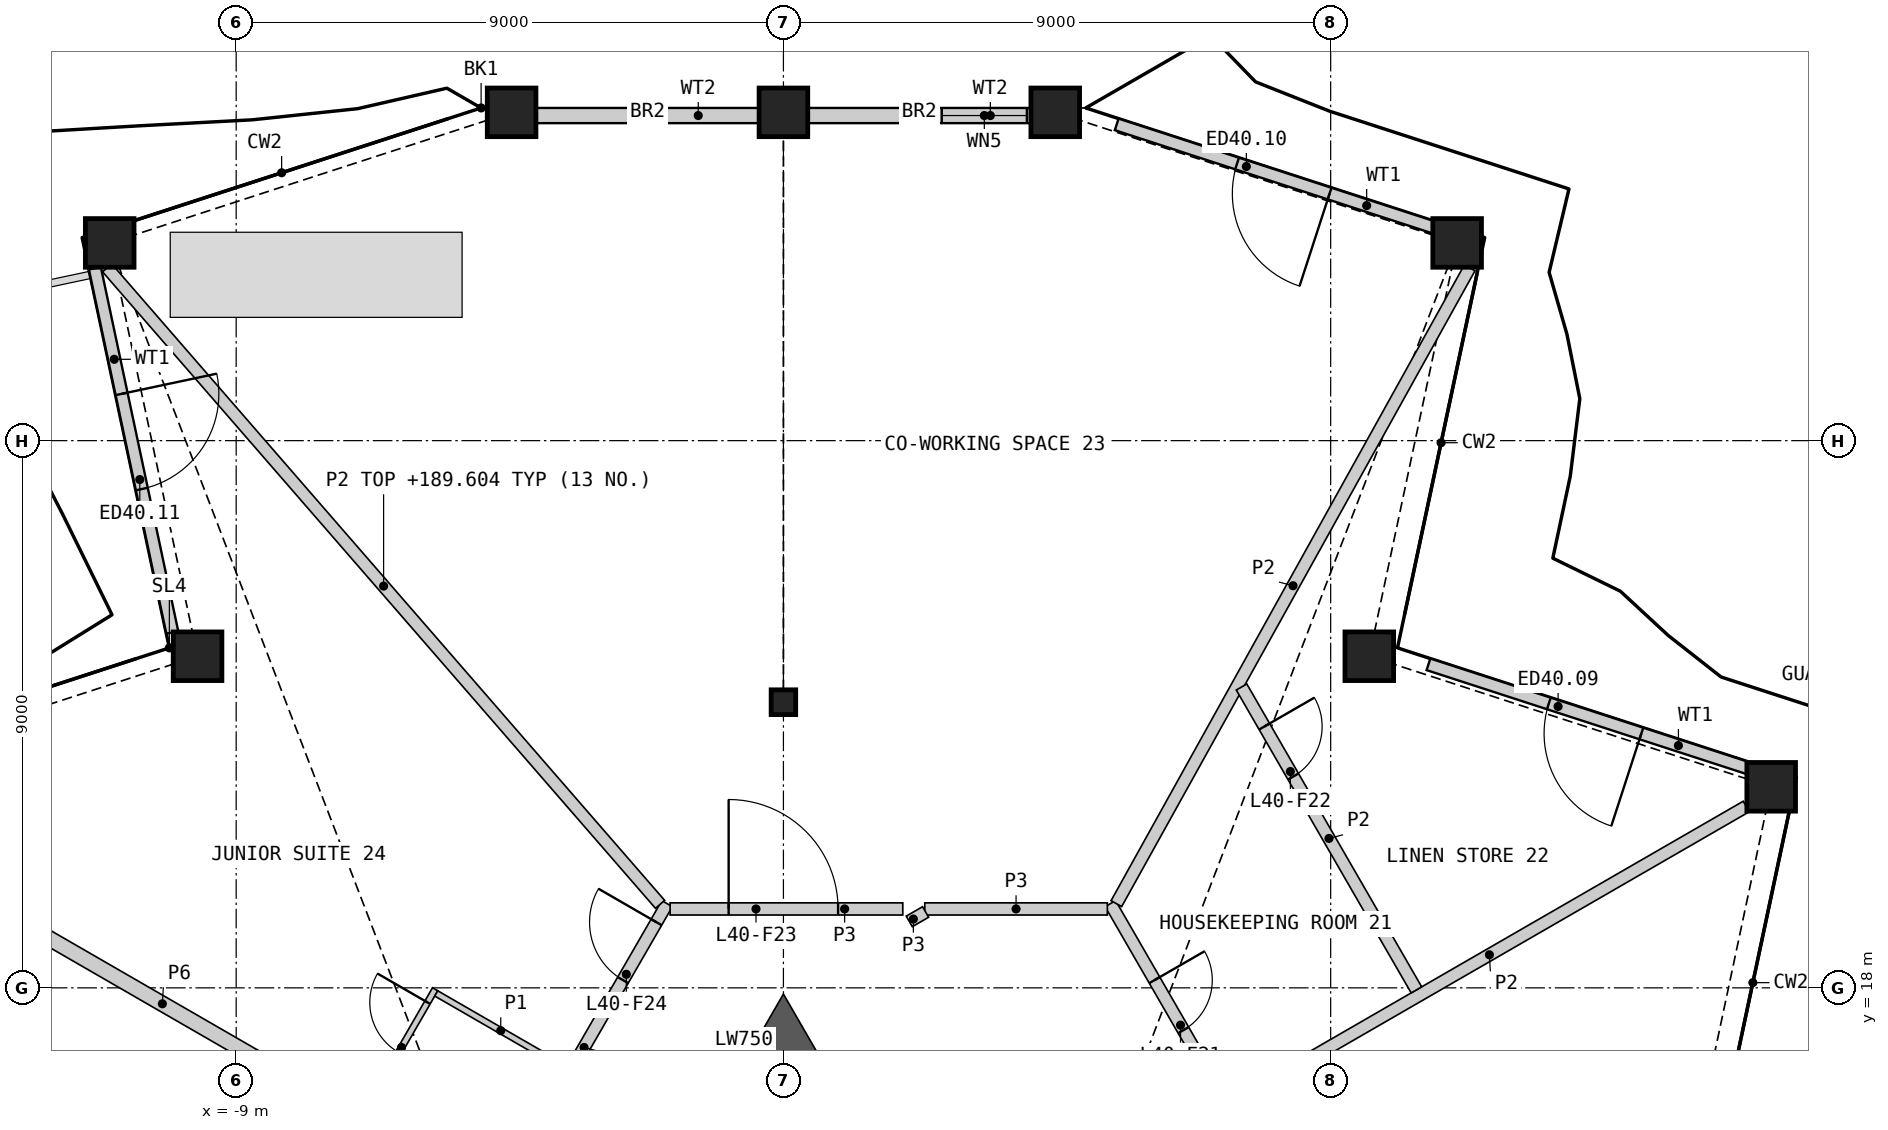
"""IFC4 building model, lengths in metres.
Left out: names, types, materials, properties, quantities, classifications, styles, units other than length and angle.
Written with IfcOpenShell. Run it as: python <this file> out.ifc"""

import sys

from ifc_helpers import new_model, si_unit, direction, frame, frame_2d, origin, origin_2d, place, context, subcontext, project, spatial, polyline, rectangle, hollow_rectangle, i_section, outline, extrude, element, fill, save


model = new_model("IFC4")
c1 = context("Model", 3, precision=1e-05, world=origin(), true_north=direction((0.0, 1.0)))
c2 = subcontext(c1, "Body", "Model", "MODEL_VIEW")
j1 = project(units=[si_unit("LENGTHUNIT", "METRE"), si_unit("PLANEANGLEUNIT", "RADIAN")], contexts=[c1])
p1 = place(None, origin())
s1 = spatial("IfcSite", under=j1, at=p1, CompositionType="ELEMENT")
p2 = place(p1, origin())
s2 = spatial("IfcBuilding", under=s1, at=p2, CompositionType="ELEMENT")
p3 = place(p2, frame((0.0, 0.0, 187.2)))
s3 = spatial("IfcBuildingStorey", under=s2, at=p3, CompositionType="ELEMENT", Elevation=187.2)
for number, where, z_axis, x_axis in (
    (1, (16.245, 21.306, 0.0), (0.0, 0.0, 1.0), (1.0, 0.0, 0.0)),
    (2, (9.635, 23.454, 0.0), (0.0, 0.0, 1.0), (1.0, 0.0, 0.0)),
    (3, (11.08, 30.252, 0.0), (0.0, 0.0, 1.0), (1.0, 0.0, 0.0)),
    (4, (4.47, 32.399, 0.0), (0.0, 0.0, 1.0), (1.0, 0.0, 0.0)),
    (5, (0.0, 32.399, 0.0), (0.0, 0.0, 1.0), (1.0, 0.0, 0.0)),
    (6, (-4.47, 32.399, 0.0), (0.0, 0.0, 1.0), (1.0, 0.0, 0.0)),
    (7, (-11.08, 30.252, 0.0), (0.0, 0.0, 1.0), (1.0, 0.0, 0.0)),
    (8, (-9.635, 23.454, 0.0), (0.0, 0.0, 1.0), (1.0, 0.0, 0.0)),
):
    element("IfcColumn", number, at=place(p3, frame(where, z_axis=z_axis, x_axis=x_axis)), inside=s3, PredefinedType="COLUMN", context=c2, shape_type="SweptSolid", body=[
        extrude(hollow_rectangle(XDim=0.8, YDim=0.8, WallThickness=0.05, at=origin_2d()), origin(), (0.0, 0.0, 1.0), 3.6),
    ])
p4 = place(p3, frame((0.0, 22.698, 0.0), z_axis=(0.0, 0.0, 1.0), x_axis=(1.0, 0.0, 0.0)))
e9 = element("IfcColumn", 9, at=p4, inside=s3, PredefinedType="COLUMN", context=c2, shape_type="SweptSolid", body=[
    extrude(i_section(OverallWidth=0.404, OverallDepth=0.407, WebThickness=0.027, FlangeThickness=0.044, at=origin_2d()), origin(), (0.0, 0.0, 1.0), 3.6),
])
p5 = place(p3, frame((16.089, 21.54, 0.0), z_axis=(0.0, 0.0, 1.0), x_axis=(-0.951053678976, 0.30902572661, 0.0)))
e10 = element("IfcWall", 10, at=p5, inside=s3, PredefinedType="SOLIDWALL", context=c2, shape_type="SweptSolid", body=[
    extrude(rectangle(XDim=5.763, YDim=0.2, at=frame_2d((2.882, 0.0))), origin(), (0.0, 0.0, 1.0), 2.701),
])
p6 = place(p5, frame((2.082, 0.0, 0.0)))
e11 = element("IfcOpeningElement", 11, at=p6, cuts=e10, PredefinedType="OPENING", context=c2, shape_type="SweptSolid", body=[
    extrude(rectangle(XDim=1.6, YDim=2.4, at=frame_2d((0.8, 1.2))), frame((0.0, 0.11, 0.0), z_axis=(0.0, -1.0, 0.0), x_axis=(1.0, 0.0, 0.0)), (0.0, 0.0, 1.0), 0.22),
])
p7 = place(p3, frame((10.962, 30.42, 0.0), z_axis=(0.0, 0.0, 1.0), x_axis=(-0.951062083689, 0.308999859173, 0.0)))
e12 = element("IfcWall", 12, at=p7, inside=s3, PredefinedType="SOLIDWALL", context=c2, shape_type="SweptSolid", body=[
    extrude(rectangle(XDim=5.763, YDim=0.2, at=frame_2d((2.881, 0.0))), origin(), (0.0, 0.0, 1.0), 2.701),
])
p8 = place(p7, frame((2.082, 0.0, 0.0)))
e13 = element("IfcOpeningElement", 13, at=p8, cuts=e12, PredefinedType="OPENING", context=c2, shape_type="SweptSolid", body=[
    extrude(rectangle(XDim=1.6, YDim=2.4, at=frame_2d((0.8, 1.2))), frame((0.0, 0.11, 0.0), z_axis=(0.0, -1.0, 0.0), x_axis=(1.0, 0.0, 0.0)), (0.0, 0.0, 1.0), 0.22),
])
p9 = place(p3, frame((4.404, 32.347, 0.0), z_axis=(0.0, 0.0, 1.0), x_axis=(-1.0, 0.0, 0.0)))
e14 = element("IfcWall", 14, at=p9, inside=s3, PredefinedType="SOLIDWALL", context=c2, shape_type="SweptSolid", body=[
    extrude(rectangle(XDim=4.004, YDim=0.25, at=frame_2d((2.002, 0.0))), origin(), (0.0, 0.0, 1.0), 2.701),
])
p10 = place(p9, frame((0.4, 0.0, 1.6)))
e15 = element("IfcOpeningElement", 15, at=p10, cuts=e14, PredefinedType="OPENING", context=c2, shape_type="SweptSolid", body=[
    extrude(rectangle(XDim=1.4, YDim=0.9, at=frame_2d((0.7, 0.45))), frame((0.0, 0.135, 0.0), z_axis=(0.0, -1.0, 0.0), x_axis=(1.0, 0.0, 0.0)), (0.0, 0.0, 1.0), 0.27),
])
p11 = place(p3, frame((-0.4, 32.347, 0.0), z_axis=(0.0, 0.0, 1.0), x_axis=(-1.0, 0.0, 0.0)))
e16 = element("IfcWall", 16, at=p11, inside=s3, PredefinedType="SOLIDWALL", context=c2, shape_type="SweptSolid", body=[
    extrude(rectangle(XDim=4.004, YDim=0.25, at=frame_2d((2.002, 0.0))), origin(), (0.0, 0.0, 1.0), 2.701),
])
p12 = place(p3, frame((-11.324, 29.835, 0.0), z_axis=(0.0, 0.0, 1.0), x_axis=(0.207925037413, -0.978144763732, 0.0)))
e17 = element("IfcWall", 17, at=p12, inside=s3, PredefinedType="SOLIDWALL", context=c2, shape_type="SweptSolid", body=[
    extrude(rectangle(XDim=6.123, YDim=0.2, at=frame_2d((3.062, 0.0))), origin(), (0.0, 0.0, 1.0), 2.701),
])
p13 = place(p12, frame((2.113, 0.0, 0.0)))
e18 = element("IfcOpeningElement", 18, at=p13, cuts=e17, PredefinedType="OPENING", context=c2, shape_type="SweptSolid", body=[
    extrude(rectangle(XDim=1.6, YDim=2.4, at=frame_2d((0.8, 1.2))), frame((0.0, 0.11, 0.0), z_axis=(0.0, -1.0, 0.0), x_axis=(1.0, 0.0, 0.0)), (0.0, 0.0, 1.0), 0.22),
])
p14 = place(p3, origin())
e19 = element("IfcWall", 19, at=p14, inside=s3, PredefinedType="SHEAR", context=c2, shape_type="SweptSolid", body=[
    extrude(outline(polyline([(-0.649, 16.773), (0.0, 17.898), (0.649, 16.773), (0.0, 16.398), (-0.649, 16.773)])), origin(), (0.0, 0.0, 1.0), 3.25),
])
p15 = place(p3, frame((5.377, 19.385, 0.0), z_axis=(0.0, 0.0, 1.0), x_axis=(0.500000757641, -0.86602496636, 0.0)))
e20 = element("IfcWall", 20, at=p15, inside=s3, PredefinedType="PARTITIONING", context=c2, shape_type="SweptSolid", body=[
    extrude(rectangle(XDim=28.198, YDim=0.2, at=frame_2d((14.099, 0.0))), origin(), (0.0, 0.0, 1.0), 3.25),
])
p16 = place(p15, frame((22.735, 0.0, 0.0)))
e21 = element("IfcOpeningElement", 21, at=p16, cuts=e20, PredefinedType="OPENING", context=c2, shape_type="SweptSolid", body=[
    extrude(rectangle(XDim=1.8, YDim=2.1, at=frame_2d((0.9, 1.05))), frame((0.0, 0.11, 0.0), z_axis=(0.0, -1.0, 0.0), x_axis=(1.0, 0.0, 0.0)), (0.0, 0.0, 1.0), 0.22),
])
p17 = place(p15, frame((14.402, 0.0, 0.0)))
e22 = element("IfcOpeningElement", 22, at=p17, cuts=e20, PredefinedType="OPENING", context=c2, shape_type="SweptSolid", body=[
    extrude(rectangle(XDim=1.0, YDim=2.1, at=frame_2d((0.5, 1.05))), frame((0.0, 0.11, 0.0), z_axis=(0.0, -1.0, 0.0), x_axis=(1.0, 0.0, 0.0)), (0.0, 0.0, 1.0), 0.22),
])
p18 = place(p15, frame((12.796, 0.0, 0.0)))
e23 = element("IfcOpeningElement", 23, at=p18, cuts=e20, PredefinedType="OPENING", context=c2, shape_type="SweptSolid", body=[
    extrude(rectangle(XDim=1.0, YDim=2.1, at=frame_2d((0.5, 1.05))), frame((0.0, 0.11, 0.0), z_axis=(0.0, -1.0, 0.0), x_axis=(1.0, 0.0, 0.0)), (0.0, 0.0, 1.0), 0.22),
])
p19 = place(p15, frame((4.164, 0.0, 0.0)))
e24 = element("IfcOpeningElement", 24, at=p19, cuts=e20, PredefinedType="OPENING", context=c2, shape_type="SweptSolid", body=[
    extrude(rectangle(XDim=1.0, YDim=2.1, at=frame_2d((0.5, 1.05))), frame((0.0, 0.11, 0.0), z_axis=(0.0, -1.0, 0.0), x_axis=(1.0, 0.0, 0.0)), (0.0, 0.0, 1.0), 0.22),
])
p20 = place(p15, frame((1.452, 0.0, 0.0)))
e25 = element("IfcOpeningElement", 25, at=p20, cuts=e20, PredefinedType="OPENING", context=c2, shape_type="SweptSolid", body=[
    extrude(rectangle(XDim=0.95, YDim=2.1, at=frame_2d((0.475, 1.05))), frame((0.0, 0.11, 0.0), z_axis=(0.0, -1.0, 0.0), x_axis=(1.0, 0.0, 0.0)), (0.0, 0.0, 1.0), 0.22),
])
p21 = place(p3, frame((-15.835, 20.983, 0.0), z_axis=(0.0, 0.0, 1.0), x_axis=(0.866022720283, -0.500004647933, 0.0)))
e26 = element("IfcWall", 26, at=p21, inside=s3, PredefinedType="PARTITIONING", context=c2, shape_type="SweptSolid", body=[
    extrude(rectangle(XDim=12.981, YDim=0.25, at=frame_2d((6.49, 0.0))), origin(), (0.0, 0.0, 1.0), 2.404),
])
p22 = place(p3, frame((-4.644, 14.655, 0.0), z_axis=(0.0, 0.0, 1.0), x_axis=(0.49998041698, 0.866036709751, 0.0)))
e27 = element("IfcWall", 27, at=p22, inside=s3, PredefinedType="PARTITIONING", context=c2, shape_type="SweptSolid", body=[
    extrude(rectangle(XDim=5.462, YDim=0.2, at=frame_2d((2.731, 0.0))), origin(), (0.0, 0.0, 1.0), 3.25),
])
p23 = place(p22, frame((4.01, 0.0, 0.0)))
e28 = element("IfcOpeningElement", 28, at=p23, cuts=e27, PredefinedType="OPENING", context=c2, shape_type="SweptSolid", body=[
    extrude(rectangle(XDim=1.1, YDim=2.1, at=frame_2d((0.55, 1.05))), frame((0.0, 0.11, 0.0), z_axis=(0.0, -1.0, 0.0), x_axis=(1.0, 0.0, 0.0)), (0.0, 0.0, 1.0), 0.22),
])
p24 = place(p3, frame((-1.863, 19.298, 0.0), z_axis=(0.0, 0.0, 1.0), x_axis=(1.0, 0.0, 0.0)))
e29 = element("IfcWall", 29, at=p24, inside=s3, PredefinedType="PARTITIONING", context=c2, shape_type="SweptSolid", body=[
    extrude(rectangle(XDim=3.826, YDim=0.2, at=frame_2d((1.913, 0.0))), origin(), (0.0, 0.0, 1.0), 3.25),
])
p25 = place(p24, frame((0.962, 0.0, 0.0)))
e30 = element("IfcOpeningElement", 30, at=p25, cuts=e29, PredefinedType="OPENING", context=c2, shape_type="SweptSolid", body=[
    extrude(rectangle(XDim=1.8, YDim=2.1, at=frame_2d((0.9, 1.05))), frame((0.0, 0.11, 0.0), z_axis=(0.0, -1.0, 0.0), x_axis=(1.0, 0.0, 0.0)), (0.0, 0.0, 1.0), 0.22),
])
p26 = place(p3, frame((2.325, 19.298, 0.0), z_axis=(0.0, 0.0, 1.0), x_axis=(1.0, 0.0, 0.0)))
e31 = element("IfcWall", 31, at=p26, inside=s3, PredefinedType="PARTITIONING", context=c2, shape_type="SweptSolid", body=[
    extrude(rectangle(XDim=3.002, YDim=0.2, at=frame_2d((1.501, 0.0))), origin(), (0.0, 0.0, 1.0), 3.25),
])
p27 = place(p3, frame((2.07, 19.093, 0.0), z_axis=(0.0, 0.0, 1.0), x_axis=(0.866395311824, 0.499358752451, 0.0)))
e32 = element("IfcWall", 32, at=p27, inside=s3, PredefinedType="PARTITIONING", context=c2, shape_type="SweptSolid", body=[
    extrude(rectangle(XDim=0.31, YDim=0.2, at=frame_2d((0.155, 0.0))), origin(), (0.0, 0.0, 1.0), 3.25),
])
p28 = place(p3, frame((-11.122, 29.842, 0.0), z_axis=(0.0, 0.0, 1.0), x_axis=(0.65579678992, -0.754937461205, 0.0)))
e33 = element("IfcWall", 33, at=p28, inside=s3, PredefinedType="PARTITIONING", context=c2, shape_type="SweptSolid", body=[
    extrude(rectangle(XDim=13.867, YDim=0.2, at=frame_2d((6.933, 0.0))), origin(), (0.0, 0.0, 1.0), 2.404),
])
p29 = place(p3, frame((5.476, 19.385, 0.0), z_axis=(0.0, 0.0, 1.0), x_axis=(0.485729569949, 0.874109137853, 0.0)))
e34 = element("IfcWall", 34, at=p29, inside=s3, PredefinedType="PARTITIONING", context=c2, shape_type="SweptSolid", body=[
    extrude(rectangle(XDim=11.962, YDim=0.2, at=frame_2d((5.981, 0.0))), origin(), (0.0, 0.0, 1.0), 2.404),
])
p30 = place(p3, frame((7.386, 16.105, 0.0), z_axis=(0.0, 0.0, 1.0), x_axis=(0.866023056814, 0.500004065051, 0.0)))
e35 = element("IfcWall", 35, at=p30, inside=s3, PredefinedType="PARTITIONING", context=c2, shape_type="SweptSolid", body=[
    extrude(rectangle(XDim=9.756, YDim=0.2, at=frame_2d((4.878, 0.0))), origin(), (0.0, 0.0, 1.0), 2.404),
])
p31 = place(p3, frame((7.534, 22.948, 0.0), z_axis=(0.0, 0.0, 1.0), x_axis=(0.499991885958, -0.866030088378, 0.0)))
e36 = element("IfcWall", 36, at=p31, inside=s3, PredefinedType="PARTITIONING", context=c2, shape_type="SweptSolid", body=[
    extrude(rectangle(XDim=5.752, YDim=0.2, at=frame_2d((2.876, 0.0))), origin(), (0.0, 0.0, 1.0), 2.404),
])
p32 = place(p31, frame((0.75, 0.0, 0.0)))
e37 = element("IfcOpeningElement", 37, at=p32, cuts=e36, PredefinedType="OPENING", context=c2, shape_type="SweptSolid", body=[
    extrude(rectangle(XDim=0.95, YDim=2.1, at=frame_2d((0.475, 1.05))), frame((0.0, 0.11, 0.0), z_axis=(0.0, -1.0, 0.0), x_axis=(1.0, 0.0, 0.0)), (0.0, 0.0, 1.0), 0.22),
])
p33 = place(p3, frame((-8.328, 13.473, 0.0), z_axis=(0.0, 0.0, 1.0), x_axis=(0.499992051641, 0.866029992723, 0.0)))
e38 = element("IfcWall", 38, at=p33, inside=s3, PredefinedType="PARTITIONING", context=c2, shape_type="SweptSolid", body=[
    extrude(rectangle(XDim=5.2, YDim=0.1, at=frame_2d((2.6, 0.0))), origin(), (0.0, 0.0, 1.0), 2.404),
])
p34 = place(p33, frame((4.0, 0.0, 0.0)))
e39 = element("IfcOpeningElement", 39, at=p34, cuts=e38, PredefinedType="OPENING", context=c2, shape_type="SweptSolid", body=[
    extrude(rectangle(XDim=0.95, YDim=2.1, at=frame_2d((0.475, 1.05))), frame((0.0, 0.06, 0.0), z_axis=(0.0, -1.0, 0.0), x_axis=(1.0, 0.0, 0.0)), (0.0, 0.0, 1.0), 0.12),
])
p35 = place(p33, frame((0.25, 0.0, 0.0)))
e40 = element("IfcOpeningElement", 40, at=p35, cuts=e38, PredefinedType="OPENING", context=c2, shape_type="SweptSolid", body=[
    extrude(rectangle(XDim=0.95, YDim=2.1, at=frame_2d((0.475, 1.05))), frame((0.0, 0.06, 0.0), z_axis=(0.0, -1.0, 0.0), x_axis=(1.0, 0.0, 0.0)), (0.0, 0.0, 1.0), 0.12),
])
p36 = place(p3, frame((-5.71, 17.908, 0.0), z_axis=(0.0, 0.0, 1.0), x_axis=(0.866057815567, -0.499943856944, 0.0)))
e41 = element("IfcWall", 41, at=p36, inside=s3, PredefinedType="PARTITIONING", context=c2, shape_type="SweptSolid", body=[
    extrude(rectangle(XDim=2.45, YDim=0.1, at=frame_2d((1.225, 0.0))), origin(), (0.0, 0.0, 1.0), 2.404),
])
p37 = place(p6, origin())
e42 = element("IfcDoor", 42, at=p37, inside=s3, OperationType="DOUBLE_DOOR_SINGLE_SWING", PredefinedType="DOOR", context=c2, shape_type="SweptSolid", body=[
    extrude(rectangle(XDim=1.6, YDim=2.4, at=frame_2d((0.8, 1.2))), frame((0.0, 0.025, 0.0), z_axis=(0.0, -1.0, 0.0), x_axis=(1.0, 0.0, 0.0)), (0.0, 0.0, 1.0), 0.05),
])
fill(e11, e42)
p38 = place(p8, origin())
e43 = element("IfcDoor", 43, at=p38, inside=s3, OperationType="DOUBLE_DOOR_SINGLE_SWING", PredefinedType="DOOR", context=c2, shape_type="SweptSolid", body=[
    extrude(rectangle(XDim=1.6, YDim=2.4, at=frame_2d((0.8, 1.2))), frame((0.0, 0.025, 0.0), z_axis=(0.0, -1.0, 0.0), x_axis=(1.0, 0.0, 0.0)), (0.0, 0.0, 1.0), 0.05),
])
fill(e13, e43)
p39 = place(p10, origin())
e44 = element("IfcWindow", 44, at=p39, inside=s3, PartitioningType="SINGLE_PANEL", PredefinedType="WINDOW", context=c2, shape_type="SweptSolid", body=[
    extrude(rectangle(XDim=1.4, YDim=0.9, at=frame_2d((0.7, 0.45))), frame((0.0, 0.03, 0.0), z_axis=(0.0, -1.0, 0.0), x_axis=(1.0, 0.0, 0.0)), (0.0, 0.0, 1.0), 0.06),
])
fill(e15, e44)
p40 = place(p13, origin())
e45 = element("IfcDoor", 45, at=p40, inside=s3, OperationType="DOUBLE_DOOR_SINGLE_SWING", PredefinedType="DOOR", context=c2, shape_type="SweptSolid", body=[
    extrude(rectangle(XDim=1.6, YDim=2.4, at=frame_2d((0.8, 1.2))), frame((0.0, 0.025, 0.0), z_axis=(0.0, -1.0, 0.0), x_axis=(1.0, 0.0, 0.0)), (0.0, 0.0, 1.0), 0.05),
])
fill(e18, e45)
p41 = place(p20, origin())
e46 = element("IfcDoor", 46, at=p41, inside=s3, OperationType="SINGLE_SWING_LEFT", PredefinedType="DOOR", context=c2, shape_type="SweptSolid", body=[
    extrude(rectangle(XDim=0.95, YDim=2.1, at=frame_2d((0.475, 1.05))), frame((0.0, 0.025, 0.0), z_axis=(0.0, -1.0, 0.0), x_axis=(1.0, 0.0, 0.0)), (0.0, 0.0, 1.0), 0.05),
])
fill(e25, e46)
p42 = place(p32, origin())
e47 = element("IfcDoor", 47, at=p42, inside=s3, OperationType="SINGLE_SWING_LEFT", PredefinedType="DOOR", context=c2, shape_type="SweptSolid", body=[
    extrude(rectangle(XDim=0.95, YDim=2.1, at=frame_2d((0.475, 1.05))), frame((0.0, 0.025, 0.0), z_axis=(0.0, -1.0, 0.0), x_axis=(1.0, 0.0, 0.0)), (0.0, 0.0, 1.0), 0.05),
])
fill(e37, e47)
p43 = place(p25, origin())
e48 = element("IfcDoor", 48, at=p43, inside=s3, OperationType="DOUBLE_DOOR_SINGLE_SWING", PredefinedType="DOOR", context=c2, shape_type="SweptSolid", body=[
    extrude(rectangle(XDim=1.8, YDim=2.1, at=frame_2d((0.9, 1.05))), frame((0.0, 0.025, 0.0), z_axis=(0.0, -1.0, 0.0), x_axis=(1.0, 0.0, 0.0)), (0.0, 0.0, 1.0), 0.05),
])
fill(e30, e48)
p44 = place(p23, origin())
e49 = element("IfcDoor", 49, at=p44, inside=s3, OperationType="SINGLE_SWING_RIGHT", PredefinedType="DOOR", context=c2, shape_type="SweptSolid", body=[
    extrude(rectangle(XDim=1.1, YDim=2.1, at=frame_2d((0.55, 1.05))), frame((0.0, 0.025, 0.0), z_axis=(0.0, -1.0, 0.0), x_axis=(1.0, 0.0, 0.0)), (0.0, 0.0, 1.0), 0.05),
])
fill(e28, e49)
p45 = place(p34, origin())
e50 = element("IfcDoor", 50, at=p45, inside=s3, OperationType="SINGLE_SWING_RIGHT", PredefinedType="DOOR", context=c2, shape_type="SweptSolid", body=[
    extrude(rectangle(XDim=0.95, YDim=2.1, at=frame_2d((0.475, 1.05))), frame((0.0, 0.025, 0.0), z_axis=(0.0, -1.0, 0.0), x_axis=(1.0, 0.0, 0.0)), (0.0, 0.0, 1.0), 0.05),
])
fill(e39, e50)
save(model, sys.argv[1])
